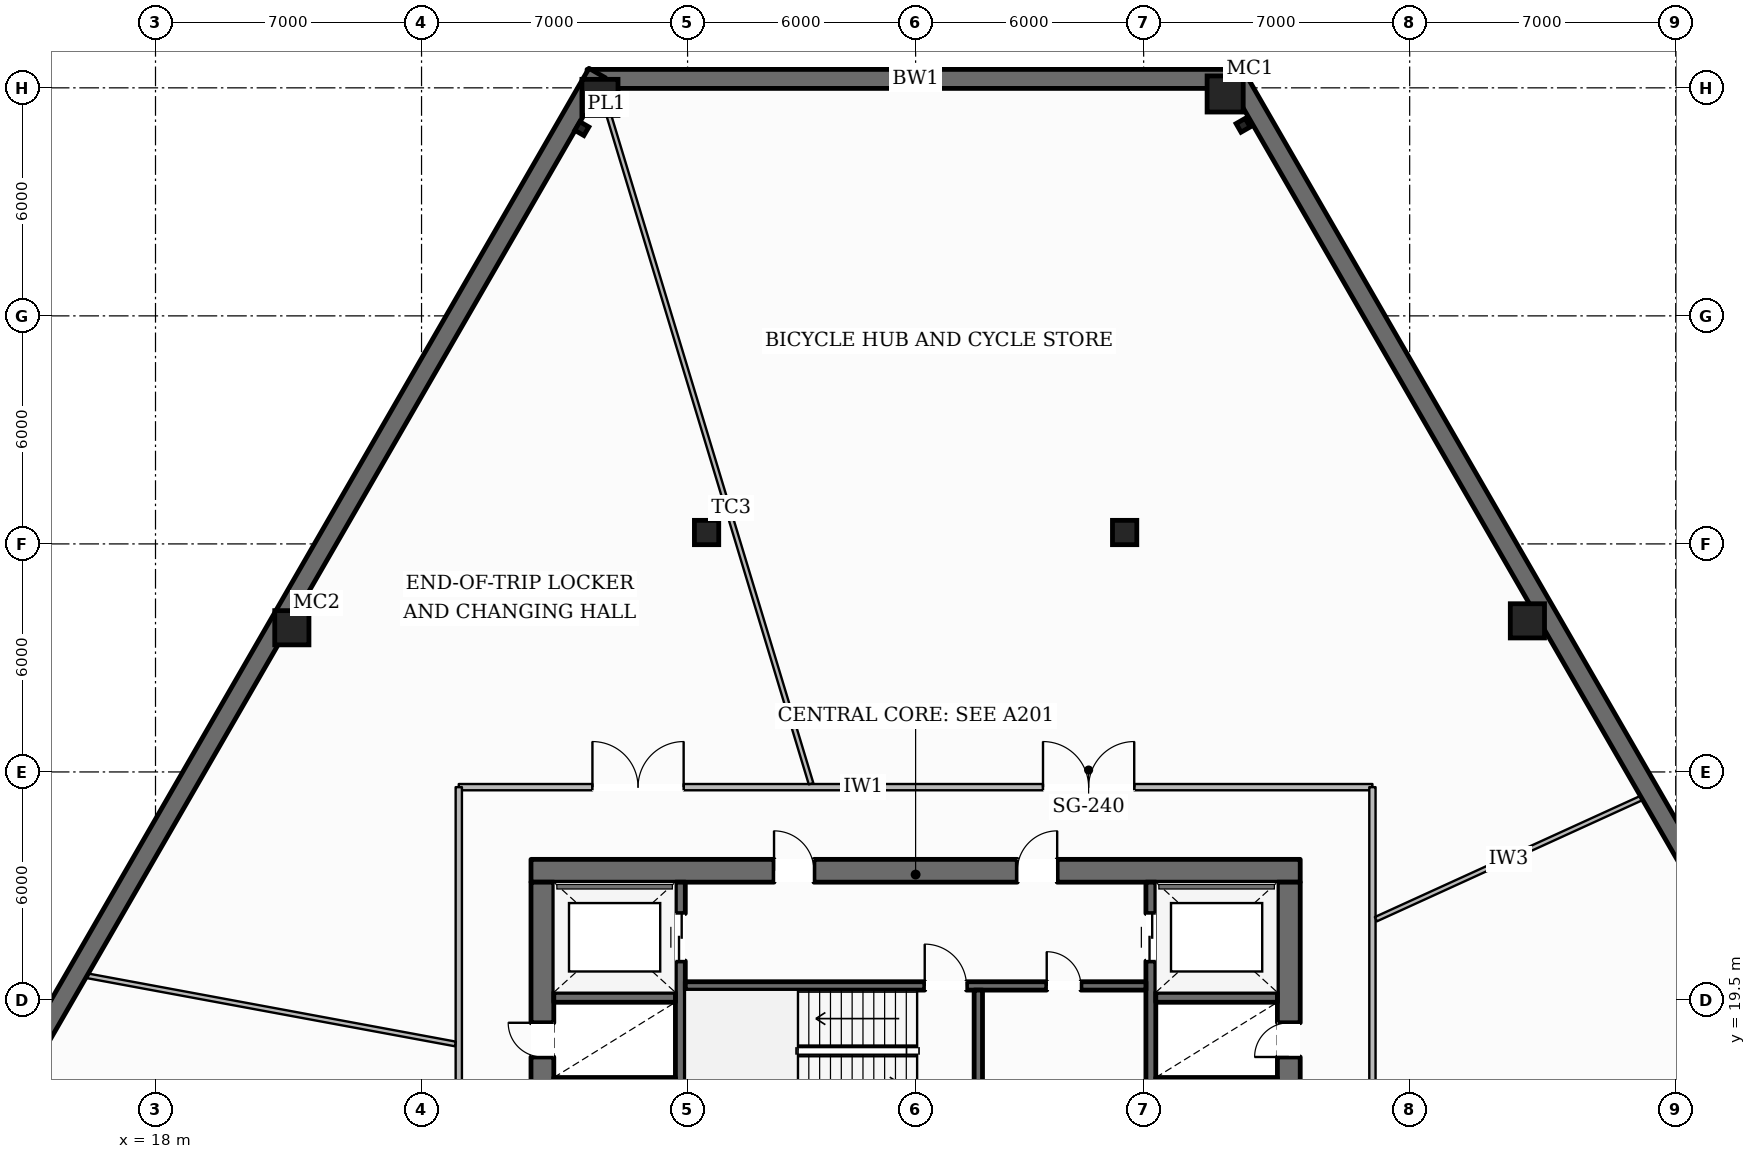
"""IFC4 building model, lengths in metres.
Left out: names, types, materials, properties, quantities, classifications, styles, units other than length and angle.
Written with IfcOpenShell. Run it as: python <this file> out.ifc"""

import sys

from ifc_helpers import new_model, si_unit, direction, frame, frame_2d, origin, origin_2d, place, context, subcontext, project, spatial, rectangle, hollow_rectangle, i_section, extrude, element, fill, save


model = new_model("IFC4")
c1 = context("Model", 3, precision=1e-05, world=origin(), true_north=direction((0.0, 1.0)))
c2 = subcontext(c1, "Body", "Model", "MODEL_VIEW")
j1 = project(units=[si_unit("LENGTHUNIT", "METRE"), si_unit("PLANEANGLEUNIT", "RADIAN")], contexts=[c1])
p1 = place(None, origin())
s1 = spatial("IfcSite", under=j1, at=p1, CompositionType="ELEMENT")
p2 = place(p1, origin())
s2 = spatial("IfcBuilding", under=s1, at=p2, CompositionType="ELEMENT")
p3 = place(p2, frame((0.0, 0.0, -4.2)))
s3 = spatial("IfcBuildingStorey", under=s2, at=p3, CompositionType="ELEMENT", Elevation=-4.2)
p4 = place(p3, frame((46.644, 43.736, 0.0), z_axis=(0.0, 0.0, 1.0), x_axis=(-1.0, 0.0, 0.0)))
e1 = element("IfcWall", 1, at=p4, inside=s3, PredefinedType="SHEAR", context=c2, shape_type="SweptSolid", body=[
    extrude(rectangle(XDim=17.289, YDim=0.5, at=frame_2d((8.644, 0.0))), origin(), (0.0, 0.0, 1.0), 3.94),
])
for number, where, z_axis, x_axis in (
    (2, (29.622, 43.889, 0.0), (0.0, 0.0, 1.0), (-0.5, -0.866, 0.0)),
    (3, (62.878, 15.311, 0.0), (0.0, 0.0, 1.0), (-0.5, 0.866, 0.0)),
):
    element("IfcWall", number, at=place(p3, frame(where, z_axis=z_axis, x_axis=x_axis)), inside=s3, PredefinedType="SHEAR", context=c2, shape_type="SweptSolid", body=[
        extrude(rectangle(XDim=33.0, YDim=0.5, at=frame_2d((16.5, 0.0))), origin(), (0.0, 0.0, 1.0), 3.94),
    ])
p5 = place(p3, frame((27.88, 22.9, 0.0), z_axis=(0.0, 0.0, 1.0), x_axis=(1.0, 0.0, 0.0)))
e4 = element("IfcWall", 4, at=p5, inside=s3, PredefinedType="SOLIDWALL", context=c2, shape_type="SweptSolid", body=[
    extrude(rectangle(XDim=20.24, YDim=0.6, at=frame_2d((10.12, 0.0))), origin(), (0.0, 0.0, 1.0), 3.94),
])
p6 = place(p5, frame((6.395, 0.0, 0.0)))
e5 = element("IfcOpeningElement", 5, at=p6, cuts=e4, PredefinedType="OPENING", context=c2, shape_type="SweptSolid", body=[
    extrude(rectangle(XDim=1.05, YDim=2.15, at=frame_2d((0.525, 1.075))), frame((0.0, 0.31, 0.0), z_axis=(0.0, -1.0, 0.0), x_axis=(1.0, 0.0, 0.0)), (0.0, 0.0, 1.0), 0.62),
])
p7 = place(p5, frame((12.795, 0.0, 0.0)))
e6 = element("IfcOpeningElement", 6, at=p7, cuts=e4, PredefinedType="OPENING", context=c2, shape_type="SweptSolid", body=[
    extrude(rectangle(XDim=1.05, YDim=2.15, at=frame_2d((0.525, 1.075))), frame((0.0, 0.31, 0.0), z_axis=(0.0, -1.0, 0.0), x_axis=(1.0, 0.0, 0.0)), (0.0, 0.0, 1.0), 0.62),
])
p8 = place(p3, frame((28.18, 9.6, 0.0), z_axis=(0.0, 0.0, 1.0), x_axis=(0.0, 1.0, 0.0)))
e7 = element("IfcWall", 7, at=p8, inside=s3, PredefinedType="SOLIDWALL", context=c2, shape_type="SweptSolid", body=[
    extrude(rectangle(XDim=13.0, YDim=0.6, at=frame_2d((6.5, 0.0))), origin(), (0.0, 0.0, 1.0), 3.94),
])
p9 = place(p8, frame((0.2, 0.0, 0.0)))
e8 = element("IfcOpeningElement", 8, at=p9, cuts=e7, PredefinedType="OPENING", context=c2, shape_type="SweptSolid", body=[
    extrude(rectangle(XDim=1.1, YDim=2.15, at=frame_2d((0.55, 1.075))), frame((0.0, 0.31, 0.0), z_axis=(0.0, -1.0, 0.0), x_axis=(1.0, 0.0, 0.0)), (0.0, 0.0, 1.0), 0.62),
])
p10 = place(p8, frame((8.4, 0.0, 0.0)))
e9 = element("IfcOpeningElement", 9, at=p10, cuts=e7, PredefinedType="OPENING", context=c2, shape_type="SweptSolid", body=[
    extrude(rectangle(XDim=0.9, YDim=2.1, at=frame_2d((0.45, 1.05))), frame((0.0, 0.31, 0.0), z_axis=(0.0, -1.0, 0.0), x_axis=(1.0, 0.0, 0.0)), (0.0, 0.0, 1.0), 0.62),
])
p11 = place(p3, frame((47.82, 9.6, 0.0), z_axis=(0.0, 0.0, 1.0), x_axis=(0.0, 1.0, 0.0)))
e10 = element("IfcWall", 10, at=p11, inside=s3, PredefinedType="SOLIDWALL", context=c2, shape_type="SweptSolid", body=[
    extrude(rectangle(XDim=13.0, YDim=0.6, at=frame_2d((6.5, 0.0))), origin(), (0.0, 0.0, 1.0), 3.94),
])
p12 = place(p11, frame((0.2, 0.0, 0.0)))
e11 = element("IfcOpeningElement", 11, at=p12, cuts=e10, PredefinedType="OPENING", context=c2, shape_type="SweptSolid", body=[
    extrude(rectangle(XDim=1.1, YDim=2.15, at=frame_2d((0.55, 1.075))), frame((0.0, 0.31, 0.0), z_axis=(0.0, -1.0, 0.0), x_axis=(1.0, 0.0, 0.0)), (0.0, 0.0, 1.0), 0.62),
])
p13 = place(p11, frame((8.4, 0.0, 0.0)))
e12 = element("IfcOpeningElement", 12, at=p13, cuts=e10, PredefinedType="OPENING", context=c2, shape_type="SweptSolid", body=[
    extrude(rectangle(XDim=0.9, YDim=2.1, at=frame_2d((0.45, 1.05))), frame((0.0, 0.31, 0.0), z_axis=(0.0, -1.0, 0.0), x_axis=(1.0, 0.0, 0.0)), (0.0, 0.0, 1.0), 0.62),
])
p14 = place(p3, frame((31.81, 9.6, 0.0), z_axis=(0.0, 0.0, 1.0), x_axis=(0.0, 1.0, 0.0)))
e13 = element("IfcWall", 13, at=p14, inside=s3, PredefinedType="SHEAR", context=c2, shape_type="SweptSolid", body=[
    extrude(rectangle(XDim=13.0, YDim=0.26, at=frame_2d((6.5, 0.0))), origin(), (0.0, 0.0, 1.0), 3.94),
])
p15 = place(p14, frame((10.925, 0.0, 0.0)))
e14 = element("IfcOpeningElement", 14, at=p15, cuts=e13, PredefinedType="OPENING", context=c2, shape_type="SweptSolid", body=[
    extrude(rectangle(XDim=1.25, YDim=2.25, at=frame_2d((0.625, 1.125))), frame((0.0, 0.14, 0.0), z_axis=(0.0, -1.0, 0.0), x_axis=(1.0, 0.0, 0.0)), (0.0, 0.0, 1.0), 0.28),
])
p16 = place(p3, frame((44.19, 9.6, 0.0), z_axis=(0.0, 0.0, 1.0), x_axis=(0.0, 1.0, 0.0)))
e15 = element("IfcWall", 15, at=p16, inside=s3, PredefinedType="SHEAR", context=c2, shape_type="SweptSolid", body=[
    extrude(rectangle(XDim=13.0, YDim=0.26, at=frame_2d((6.5, 0.0))), origin(), (0.0, 0.0, 1.0), 3.94),
])
p17 = place(p16, frame((10.925, 0.0, 0.0)))
e16 = element("IfcOpeningElement", 16, at=p17, cuts=e15, PredefinedType="OPENING", context=c2, shape_type="SweptSolid", body=[
    extrude(rectangle(XDim=1.25, YDim=2.25, at=frame_2d((0.625, 1.125))), frame((0.0, 0.14, 0.0), z_axis=(0.0, -1.0, 0.0), x_axis=(1.0, 0.0, 0.0)), (0.0, 0.0, 1.0), 0.28),
])
for number, where, z_axis, x_axis in (
    (17, (28.48, 17.33, 0.0), (0.0, 0.0, 1.0), (1.0, 0.0, 0.0)),
    (18, (28.48, 19.57, 0.0), (0.0, 0.0, 1.0), (1.0, 0.0, 0.0)),
    (19, (44.32, 17.33, 0.0), (0.0, 0.0, 1.0), (1.0, 0.0, 0.0)),
    (20, (44.32, 19.57, 0.0), (0.0, 0.0, 1.0), (1.0, 0.0, 0.0)),
):
    element("IfcWall", number, at=place(p3, frame(where, z_axis=z_axis, x_axis=x_axis)), inside=s3, PredefinedType="SHEAR", context=c2, shape_type="SweptSolid", body=[
        extrude(rectangle(XDim=3.2, YDim=0.26, at=frame_2d((1.6, 0.0))), origin(), (0.0, 0.0, 1.0), 3.94),
    ])
p18 = place(p3, frame((31.94, 19.87, 0.0), z_axis=(0.0, 0.0, 1.0), x_axis=(1.0, 0.0, 0.0)))
e21 = element("IfcWall", 21, at=p18, inside=s3, PredefinedType="SOLIDWALL", context=c2, shape_type="SweptSolid", body=[
    extrude(rectangle(XDim=12.12, YDim=0.22, at=frame_2d((6.06, 0.0))), origin(), (0.0, 0.0, 1.0), 3.94),
])
p19 = place(p18, frame((6.3, 0.0, 0.0)))
e22 = element("IfcOpeningElement", 22, at=p19, cuts=e21, PredefinedType="OPENING", context=c2, shape_type="SweptSolid", body=[
    extrude(rectangle(XDim=1.1, YDim=2.15, at=frame_2d((0.55, 1.075))), frame((0.0, 0.12, 0.0), z_axis=(0.0, -1.0, 0.0), x_axis=(1.0, 0.0, 0.0)), (0.0, 0.0, 1.0), 0.24),
])
p20 = place(p18, frame((9.51, 0.0, 0.0)))
e23 = element("IfcOpeningElement", 23, at=p20, cuts=e21, PredefinedType="OPENING", context=c2, shape_type="SweptSolid", body=[
    extrude(rectangle(XDim=0.9, YDim=2.1, at=frame_2d((0.45, 1.05))), frame((0.0, 0.12, 0.0), z_axis=(0.0, -1.0, 0.0), x_axis=(1.0, 0.0, 0.0)), (0.0, 0.0, 1.0), 0.24),
])
p21 = place(p3, frame((39.65, 16.56, 0.0), z_axis=(0.0, 0.0, 1.0), x_axis=(0.0, 1.0, 0.0)))
e24 = element("IfcWall", 24, at=p21, inside=s3, PredefinedType="SOLIDWALL", context=c2, shape_type="SweptSolid", body=[
    extrude(rectangle(XDim=3.2, YDim=0.22, at=frame_2d((1.6, 0.0))), origin(), (0.0, 0.0, 1.0), 3.94),
])
for number, where, z_axis, x_axis in (
    (25, (46.145, 43.339, 0.0), (0.0, 0.0, 1.0), (1.0, 0.0, 0.0)),
    (26, (29.695, 43.249, 0.0), (0.0, 0.0, 1.0), (1.0, 0.0, 0.0)),
):
    element("IfcColumn", number, at=place(p3, frame(where, z_axis=z_axis, x_axis=x_axis)), inside=s3, PredefinedType="COLUMN", context=c2, shape_type="SweptSolid", body=[
        extrude(hollow_rectangle(XDim=0.95, YDim=0.95, WallThickness=0.04, at=origin_2d()), origin(), (0.0, 0.0, 1.0), 3.94),
    ])
for number, where, z_axis, x_axis in (
    (27, (21.587, 29.294, 0.0), (0.0, 0.0, 1.0), (1.0, 0.0, 0.0)),
    (28, (54.098, 29.476, 0.0), (0.0, 0.0, 1.0), (1.0, 0.0, 0.0)),
):
    element("IfcColumn", number, at=place(p3, frame(where, z_axis=z_axis, x_axis=x_axis)), inside=s3, PredefinedType="COLUMN", context=c2, shape_type="SweptSolid", body=[
        extrude(hollow_rectangle(XDim=0.9, YDim=0.9, WallThickness=0.038, at=origin_2d()), origin(), (0.0, 0.0, 1.0), 3.94),
    ])
for number, where, z_axis, x_axis in (
    (29, (29.217, 42.427, 0.0), (0.0, 0.0, 1.0), (-0.502, -0.865, 0.0)),
    (30, (46.617, 42.515, 0.0), (0.0, 0.0, 1.0), (-0.498, 0.867, 0.0)),
):
    element("IfcColumn", number, at=place(p3, frame(where, z_axis=z_axis, x_axis=x_axis)), inside=s3, PredefinedType="PILASTER", context=c2, shape_type="SweptSolid", body=[
        extrude(i_section(OverallWidth=0.261, OverallDepth=0.276, WebThickness=0.015, FlangeThickness=0.025, at=origin_2d()), origin(), (0.0, 0.0, 1.0), 3.94),
    ])
for number, where, z_axis, x_axis in (
    (31, (32.5, 31.8, 0.0), (0.0, 0.0, 1.0), (1.0, 0.0, 0.0)),
    (32, (43.5, 31.8, 0.0), (0.0, 0.0, 1.0), (1.0, 0.0, 0.0)),
):
    element("IfcColumn", number, at=place(p3, frame(where, z_axis=z_axis, x_axis=x_axis)), inside=s3, PredefinedType="COLUMN", context=c2, shape_type="SweptSolid", body=[
        extrude(hollow_rectangle(XDim=0.64, YDim=0.64, WallThickness=0.028, at=origin_2d()), origin(), (0.0, 0.0, 1.0), 3.94),
    ])
p22 = place(p3, frame((25.98, 25.1, 0.0), z_axis=(0.0, 0.0, 1.0), x_axis=(1.0, 0.0, 0.0)))
e33 = element("IfcWall", 33, at=p22, inside=s3, PredefinedType="PARTITIONING", context=c2, shape_type="SweptSolid", body=[
    extrude(rectangle(XDim=24.04, YDim=0.165, at=frame_2d((12.02, 0.0))), origin(), (0.0, 0.0, 1.0), 3.94),
])
p23 = place(p22, frame((15.372, 0.0, 0.0)))
e34 = element("IfcOpeningElement", 34, at=p23, cuts=e33, PredefinedType="OPENING", context=c2, shape_type="SweptSolid", body=[
    extrude(rectangle(XDim=2.4, YDim=2.4, at=frame_2d((1.2, 1.2))), frame((0.0, 0.093, 0.0), z_axis=(0.0, -1.0, 0.0), x_axis=(1.0, 0.0, 0.0)), (0.0, 0.0, 1.0), 0.185),
])
p24 = place(p22, frame((3.517, 0.0, 0.0)))
e35 = element("IfcOpeningElement", 35, at=p24, cuts=e33, PredefinedType="OPENING", context=c2, shape_type="SweptSolid", body=[
    extrude(rectangle(XDim=2.4, YDim=2.4, at=frame_2d((1.2, 1.2))), frame((0.0, 0.093, 0.0), z_axis=(0.0, -1.0, 0.0), x_axis=(1.0, 0.0, 0.0)), (0.0, 0.0, 1.0), 0.185),
])
p25 = place(p3, frame((25.98, 7.1, 0.0), z_axis=(0.0, 0.0, 1.0), x_axis=(0.0, 1.0, 0.0)))
e36 = element("IfcWall", 36, at=p25, inside=s3, PredefinedType="PARTITIONING", context=c2, shape_type="SweptSolid", body=[
    extrude(rectangle(XDim=18.0, YDim=0.165, at=frame_2d((9.0, 0.0))), origin(), (0.0, 0.0, 1.0), 3.94),
])
p26 = place(p25, frame((4.505, 0.0, 0.0)))
e37 = element("IfcOpeningElement", 37, at=p26, cuts=e36, PredefinedType="OPENING", context=c2, shape_type="SweptSolid", body=[
    extrude(rectangle(XDim=2.4, YDim=2.4, at=frame_2d((1.2, 1.2))), frame((0.0, 0.093, 0.0), z_axis=(0.0, -1.0, 0.0), x_axis=(1.0, 0.0, 0.0)), (0.0, 0.0, 1.0), 0.185),
])
p27 = place(p3, frame((50.02, 7.1, 0.0), z_axis=(0.0, 0.0, 1.0), x_axis=(0.0, 1.0, 0.0)))
e38 = element("IfcWall", 38, at=p27, inside=s3, PredefinedType="PARTITIONING", context=c2, shape_type="SweptSolid", body=[
    extrude(rectangle(XDim=18.0, YDim=0.165, at=frame_2d((9.0, 0.0))), origin(), (0.0, 0.0, 1.0), 3.628),
])
p28 = place(p27, frame((6.144, 0.0, 0.0)))
e39 = element("IfcOpeningElement", 39, at=p28, cuts=e38, PredefinedType="OPENING", context=c2, shape_type="SweptSolid", body=[
    extrude(rectangle(XDim=2.4, YDim=2.4, at=frame_2d((1.2, 1.2))), frame((0.0, 0.093, 0.0), z_axis=(0.0, -1.0, 0.0), x_axis=(1.0, 0.0, 0.0)), (0.0, 0.0, 1.0), 0.185),
])
p29 = place(p3, frame((50.111, 21.626, 0.0), z_axis=(0.0, 0.0, 1.0), x_axis=(0.909768462503, 0.415116061643, 0.0)))
e40 = element("IfcWall", 40, at=p29, inside=s3, PredefinedType="PARTITIONING", context=c2, shape_type="SweptSolid", body=[
    extrude(rectangle(XDim=7.674, YDim=0.125, at=frame_2d((3.837, 0.0))), origin(), (0.0, 0.0, 1.0), 3.94),
])
p30 = place(p3, frame((35.249, 25.19, 0.0), z_axis=(0.0, 0.0, 1.0), x_axis=(-0.289619538285, 0.957141851057, 0.0)))
e41 = element("IfcWall", 41, at=p30, inside=s3, PredefinedType="PARTITIONING", context=c2, shape_type="SweptSolid", body=[
    extrude(rectangle(XDim=18.362, YDim=0.125, at=frame_2d((9.181, 0.0))), origin(), (0.0, 0.0, 1.0), 3.94),
])
p31 = place(p3, frame((25.889, 18.343, 0.0), z_axis=(0.0, 0.0, 1.0), x_axis=(-0.983273782179, 0.182133657733, 0.0)))
e42 = element("IfcWall", 42, at=p31, inside=s3, PredefinedType="PARTITIONING", context=c2, shape_type="SweptSolid", body=[
    extrude(rectangle(XDim=9.846, YDim=0.125, at=frame_2d((4.923, 0.0))), origin(), (0.0, 0.0, 1.0), 3.94),
])
p32 = place(p19, origin())
e43 = element("IfcDoor", 43, at=p32, inside=s3, OperationType="SINGLE_SWING_LEFT", PredefinedType="DOOR", context=c2, shape_type="SweptSolid", body=[
    extrude(rectangle(XDim=1.1, YDim=2.15, at=frame_2d((0.55, 1.075))), frame((0.0, 0.025, 0.0), z_axis=(0.0, -1.0, 0.0), x_axis=(1.0, 0.0, 0.0)), (0.0, 0.0, 1.0), 0.05),
])
fill(e22, e43)
p33 = place(p10, origin())
e44 = element("IfcDoor", 44, at=p33, inside=s3, OperationType="SINGLE_SWING_RIGHT", PredefinedType="DOOR", context=c2, shape_type="SweptSolid", body=[
    extrude(rectangle(XDim=0.9, YDim=2.1, at=frame_2d((0.45, 1.05))), frame((0.0, 0.025, 0.0), z_axis=(0.0, -1.0, 0.0), x_axis=(1.0, 0.0, 0.0)), (0.0, 0.0, 1.0), 0.05),
])
fill(e9, e44)
p34 = place(p13, origin())
e45 = element("IfcDoor", 45, at=p34, inside=s3, OperationType="SINGLE_SWING_LEFT", PredefinedType="DOOR", context=c2, shape_type="SweptSolid", body=[
    extrude(rectangle(XDim=0.9, YDim=2.1, at=frame_2d((0.45, 1.05))), frame((0.0, 0.025, 0.0), z_axis=(0.0, -1.0, 0.0), x_axis=(1.0, 0.0, 0.0)), (0.0, 0.0, 1.0), 0.05),
])
fill(e12, e45)
p35 = place(p6, origin())
e46 = element("IfcDoor", 46, at=p35, inside=s3, OperationType="SINGLE_SWING_LEFT", PredefinedType="DOOR", context=c2, shape_type="SweptSolid", body=[
    extrude(rectangle(XDim=1.05, YDim=2.15, at=frame_2d((0.525, 1.075))), frame((0.0, 0.025, 0.0), z_axis=(0.0, -1.0, 0.0), x_axis=(1.0, 0.0, 0.0)), (0.0, 0.0, 1.0), 0.05),
])
fill(e5, e46)
p36 = place(p7, origin())
e47 = element("IfcDoor", 47, at=p36, inside=s3, OperationType="SINGLE_SWING_RIGHT", PredefinedType="DOOR", context=c2, shape_type="SweptSolid", body=[
    extrude(rectangle(XDim=1.05, YDim=2.15, at=frame_2d((0.525, 1.075))), frame((0.0, 0.025, 0.0), z_axis=(0.0, -1.0, 0.0), x_axis=(1.0, 0.0, 0.0)), (0.0, 0.0, 1.0), 0.05),
])
fill(e6, e47)
p37 = place(p15, origin())
e48 = element("IfcDoor", 48, at=p37, inside=s3, OperationType="DOUBLE_DOOR_SLIDING", PredefinedType="DOOR", context=c2, shape_type="SweptSolid", body=[
    extrude(rectangle(XDim=1.25, YDim=2.25, at=frame_2d((0.625, 1.125))), frame((0.0, 0.025, 0.0), z_axis=(0.0, -1.0, 0.0), x_axis=(1.0, 0.0, 0.0)), (0.0, 0.0, 1.0), 0.05),
])
fill(e14, e48)
p38 = place(p17, origin())
e49 = element("IfcDoor", 49, at=p38, inside=s3, OperationType="DOUBLE_DOOR_SLIDING", PredefinedType="DOOR", context=c2, shape_type="SweptSolid", body=[
    extrude(rectangle(XDim=1.25, YDim=2.25, at=frame_2d((0.625, 1.125))), frame((0.0, 0.025, 0.0), z_axis=(0.0, -1.0, 0.0), x_axis=(1.0, 0.0, 0.0)), (0.0, 0.0, 1.0), 0.05),
])
fill(e16, e49)
p39 = place(p20, origin())
e50 = element("IfcDoor", 50, at=p39, inside=s3, OperationType="SINGLE_SWING_LEFT", PredefinedType="DOOR", context=c2, shape_type="SweptSolid", body=[
    extrude(rectangle(XDim=0.9, YDim=2.1, at=frame_2d((0.45, 1.05))), frame((0.0, 0.025, 0.0), z_axis=(0.0, -1.0, 0.0), x_axis=(1.0, 0.0, 0.0)), (0.0, 0.0, 1.0), 0.05),
])
fill(e23, e50)
p40 = place(p23, origin())
e51 = element("IfcDoor", 51, at=p40, inside=s3, OperationType="DOUBLE_DOOR_SINGLE_SWING", PredefinedType="GATE", context=c2, shape_type="SweptSolid", body=[
    extrude(rectangle(XDim=2.4, YDim=2.4, at=frame_2d((1.2, 1.2))), frame((0.0, 0.025, 0.0), z_axis=(0.0, -1.0, 0.0), x_axis=(1.0, 0.0, 0.0)), (0.0, 0.0, 1.0), 0.05),
])
fill(e34, e51)
p41 = place(p24, origin())
e52 = element("IfcDoor", 52, at=p41, inside=s3, OperationType="DOUBLE_DOOR_SINGLE_SWING", PredefinedType="GATE", context=c2, shape_type="SweptSolid", body=[
    extrude(rectangle(XDim=2.4, YDim=2.4, at=frame_2d((1.2, 1.2))), frame((0.0, 0.025, 0.0), z_axis=(0.0, -1.0, 0.0), x_axis=(1.0, 0.0, 0.0)), (0.0, 0.0, 1.0), 0.05),
])
fill(e35, e52)
save(model, sys.argv[1])
